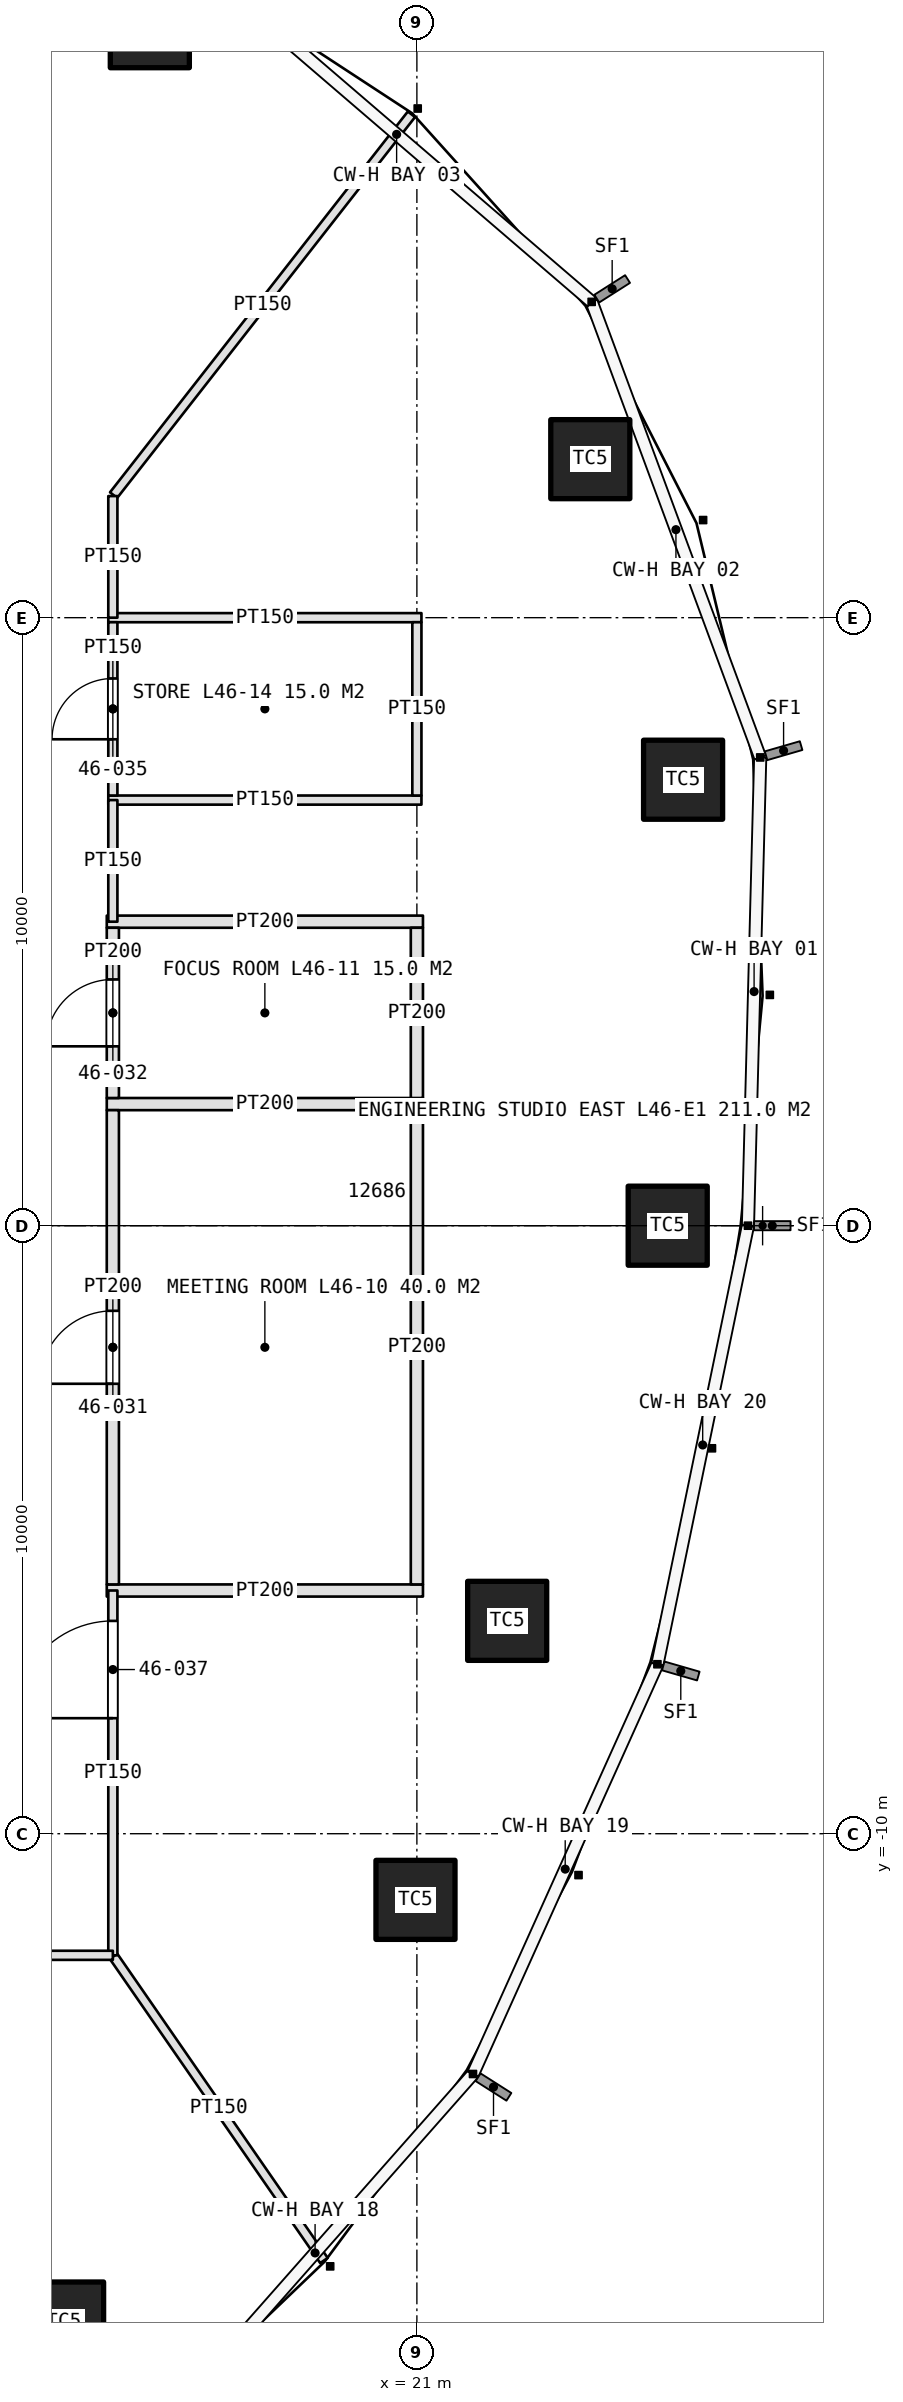
"""IFC4 building model, lengths in metres.
Left out: names, types, materials, properties, quantities, classifications, styles, units other than length and angle.
Written with IfcOpenShell. Run it as: python <this file> out.ifc"""

import sys

from ifc_helpers import new_model, si_unit, direction, frame, frame_2d, origin, origin_2d, place, context, subcontext, project, spatial, rectangle, extrude, element, fill, save


model = new_model("IFC4")
c1 = context("Model", 3, precision=1e-05, world=origin(), true_north=direction((0.0, 1.0)))
c2 = subcontext(c1, "Body", "Model", "MODEL_VIEW")
j1 = project(units=[si_unit("LENGTHUNIT", "METRE"), si_unit("PLANEANGLEUNIT", "RADIAN")], contexts=[c1])
p1 = place(None, origin())
s1 = spatial("IfcSite", under=j1, at=p1, CompositionType="ELEMENT")
p2 = place(p1, origin())
s2 = spatial("IfcBuilding", under=s1, at=p2, CompositionType="ELEMENT")
p3 = place(p2, frame((0.0, 0.0, 211.6)))
s3 = spatial("IfcBuildingStorey", under=s2, at=p3, CompositionType="ELEMENT", Elevation=211.6)
for number, where, z_axis, x_axis in (
    (1, (25.125, 0.0, 0.0), (0.0, 0.0, 1.0), (1.0, 0.0, 0.0)),
    (2, (25.378, 7.335, 0.0), (0.0, 0.0, 1.0), (1.0, 0.0, 0.0)),
    (3, (23.852, 12.607, 0.0), (0.0, 0.0, 1.0), (1.0, 0.0, 0.0)),
    (4, (16.608, 19.695, 0.0), (0.0, 0.0, 1.0), (1.0, 0.0, 0.0)),
    (5, (15.198, -18.023, 0.0), (0.0, 0.0, 1.0), (1.0, 0.0, 0.0)),
    (6, (20.977, -11.088, 0.0), (0.0, 0.0, 1.0), (1.0, 0.0, 0.0)),
    (7, (22.485, -6.499, 0.0), (0.0, 0.0, 1.0), (1.0, 0.0, 0.0)),
):
    element("IfcColumn", number, at=place(p3, frame(where, z_axis=z_axis, x_axis=x_axis)), inside=s3, PredefinedType="COLUMN", context=c2, shape_type="SweptSolid", body=[
        extrude(rectangle(XDim=1.3, YDim=1.3, at=origin_2d()), origin(), (0.0, 0.0, 1.0), 4.2),
    ])
for number, where, z_axis, x_axis in (
    (8, (15.9, -6.0, 0.0), (0.0, 0.0, 1.0), (1.0, 0.0, 0.0)),
    (9, (15.9, 2.0, 0.0), (0.0, 0.0, 1.0), (1.0, 0.0, 0.0)),
    (10, (15.9, 5.0, 0.0), (0.0, 0.0, 1.0), (1.0, 0.0, 0.0)),
):
    element("IfcWall", number, at=place(p3, frame(where, z_axis=z_axis, x_axis=x_axis)), inside=s3, PredefinedType="PARTITIONING", context=c2, shape_type="SweptSolid", body=[
        extrude(rectangle(XDim=5.2, YDim=0.2, at=frame_2d((2.6, 0.0))), origin(), (0.0, 0.0, 1.0), 3.0),
    ])
p4 = place(p3, frame((16.0, -5.9, 0.0), z_axis=(0.0, 0.0, 1.0), x_axis=(0.0, 1.0, 0.0)))
e11 = element("IfcWall", 11, at=p4, inside=s3, PredefinedType="PARTITIONING", context=c2, shape_type="SweptSolid", body=[
    extrude(rectangle(XDim=7.8, YDim=0.2, at=frame_2d((3.9, 0.0))), origin(), (0.0, 0.0, 1.0), 3.0),
])
p5 = place(p4, frame((3.3, 0.0, 0.0)))
e12 = element("IfcOpeningElement", 12, at=p5, cuts=e11, PredefinedType="OPENING", context=c2, shape_type="SweptSolid", body=[
    extrude(rectangle(XDim=1.2, YDim=2.4, at=frame_2d((0.6, 1.2))), frame((0.0, 0.11, 0.0), z_axis=(0.0, -1.0, 0.0), x_axis=(1.0, 0.0, 0.0)), (0.0, 0.0, 1.0), 0.22),
])
p6 = place(p3, frame((21.0, -5.9, 0.0), z_axis=(0.0, 0.0, 1.0), x_axis=(0.0, 1.0, 0.0)))
e13 = element("IfcWall", 13, at=p6, inside=s3, PredefinedType="PARTITIONING", context=c2, shape_type="SweptSolid", body=[
    extrude(rectangle(XDim=7.8, YDim=0.2, at=frame_2d((3.9, 0.0))), origin(), (0.0, 0.0, 1.0), 3.0),
])
p7 = place(p3, frame((16.0, 2.1, 0.0), z_axis=(0.0, 0.0, 1.0), x_axis=(0.0, 1.0, 0.0)))
e14 = element("IfcWall", 14, at=p7, inside=s3, PredefinedType="PARTITIONING", context=c2, shape_type="SweptSolid", body=[
    extrude(rectangle(XDim=2.8, YDim=0.2, at=frame_2d((1.4, 0.0))), origin(), (0.0, 0.0, 1.0), 3.0),
])
p8 = place(p7, frame((0.85, 0.0, 0.0)))
e15 = element("IfcOpeningElement", 15, at=p8, cuts=e14, PredefinedType="OPENING", context=c2, shape_type="SweptSolid", body=[
    extrude(rectangle(XDim=1.1, YDim=2.3, at=frame_2d((0.55, 1.15))), frame((0.0, 0.11, 0.0), z_axis=(0.0, -1.0, 0.0), x_axis=(1.0, 0.0, 0.0)), (0.0, 0.0, 1.0), 0.22),
])
p9 = place(p3, frame((21.0, 2.1, 0.0), z_axis=(0.0, 0.0, 1.0), x_axis=(0.0, 1.0, 0.0)))
e16 = element("IfcWall", 16, at=p9, inside=s3, PredefinedType="PARTITIONING", context=c2, shape_type="SweptSolid", body=[
    extrude(rectangle(XDim=2.8, YDim=0.2, at=frame_2d((1.4, 0.0))), origin(), (0.0, 0.0, 1.0), 3.0),
])
for number, where, z_axis, x_axis in (
    (17, (15.925, 7.0, 0.0), (0.0, 0.0, 1.0), (1.0, 0.0, 0.0)),
    (18, (15.925, 10.0, 0.0), (0.0, 0.0, 1.0), (1.0, 0.0, 0.0)),
):
    element("IfcWall", number, at=place(p3, frame(where, z_axis=z_axis, x_axis=x_axis)), inside=s3, PredefinedType="PARTITIONING", context=c2, shape_type="SweptSolid", body=[
        extrude(rectangle(XDim=5.15, YDim=0.15, at=frame_2d((2.575, 0.0))), origin(), (0.0, 0.0, 1.0), 3.0),
    ])
p10 = place(p3, frame((16.0, 7.075, 0.0), z_axis=(0.0, 0.0, 1.0), x_axis=(0.0, 1.0, 0.0)))
e19 = element("IfcWall", 19, at=p10, inside=s3, PredefinedType="PARTITIONING", context=c2, shape_type="SweptSolid", body=[
    extrude(rectangle(XDim=2.85, YDim=0.15, at=frame_2d((1.425, 0.0))), origin(), (0.0, 0.0, 1.0), 3.0),
])
p11 = place(p10, frame((0.925, 0.0, 0.0)))
e20 = element("IfcOpeningElement", 20, at=p11, cuts=e19, PredefinedType="OPENING", context=c2, shape_type="SweptSolid", body=[
    extrude(rectangle(XDim=1.0, YDim=2.2, at=frame_2d((0.5, 1.1))), frame((0.0, 0.085, 0.0), z_axis=(0.0, -1.0, 0.0), x_axis=(1.0, 0.0, 0.0)), (0.0, 0.0, 1.0), 0.17),
])
p12 = place(p3, frame((21.0, 7.075, 0.0), z_axis=(0.0, 0.0, 1.0), x_axis=(0.0, 1.0, 0.0)))
e21 = element("IfcWall", 21, at=p12, inside=s3, PredefinedType="PARTITIONING", context=c2, shape_type="SweptSolid", body=[
    extrude(rectangle(XDim=2.85, YDim=0.15, at=frame_2d((1.425, 0.0))), origin(), (0.0, 0.0, 1.0), 3.0),
])
p13 = place(p3, frame((16.011, -12.016, 0.0), z_axis=(0.0, 0.0, 1.0), x_axis=(0.568863489071, -0.822431961199, 0.0)))
e22 = element("IfcWall", 22, at=p13, inside=s3, PredefinedType="PARTITIONING", context=c2, shape_type="SweptSolid", body=[
    extrude(rectangle(XDim=6.083, YDim=0.15, at=frame_2d((3.042, 0.0))), origin(), (0.0, 0.0, 1.0), 3.0),
])
p14 = place(p3, frame((16.012, 12.016, 0.0), z_axis=(0.0, 0.0, 1.0), x_axis=(0.616030058222, 0.787722646219, 0.0)))
e23 = element("IfcWall", 23, at=p14, inside=s3, PredefinedType="PARTITIONING", context=c2, shape_type="SweptSolid", body=[
    extrude(rectangle(XDim=7.952, YDim=0.15, at=frame_2d((3.976, 0.0))), origin(), (0.0, 0.0, 1.0), 3.0),
])
p15 = place(p3, frame((16.0, -12.0, 0.0), z_axis=(0.0, 0.0, 1.0), x_axis=(0.0, 1.0, 0.0)))
e24 = element("IfcWall", 24, at=p15, inside=s3, PredefinedType="PARTITIONING", context=c2, shape_type="SweptSolid", body=[
    extrude(rectangle(XDim=6.0, YDim=0.15, at=frame_2d((3.0, 0.0))), origin(), (0.0, 0.0, 1.0), 3.0),
])
p16 = place(p15, frame((3.9, 0.0, 0.0)))
e25 = element("IfcOpeningElement", 25, at=p16, cuts=e24, PredefinedType="OPENING", context=c2, shape_type="SweptSolid", body=[
    extrude(rectangle(XDim=1.6, YDim=2.4, at=frame_2d((0.8, 1.2))), frame((0.0, 0.085, 0.0), z_axis=(0.0, -1.0, 0.0), x_axis=(1.0, 0.0, 0.0)), (0.0, 0.0, 1.0), 0.17),
])
for number, where, z_axis, x_axis in (
    (26, (16.0, 5.0, 0.0), (0.0, 0.0, 1.0), (0.0, 1.0, 0.0)),
    (27, (16.0, 10.0, 0.0), (0.0, 0.0, 1.0), (0.0, 1.0, 0.0)),
):
    element("IfcWall", number, at=place(p3, frame(where, z_axis=z_axis, x_axis=x_axis)), inside=s3, PredefinedType="PARTITIONING", context=c2, shape_type="SweptSolid", body=[
        extrude(rectangle(XDim=2.0, YDim=0.15, at=frame_2d((1.0, 0.0))), origin(), (0.0, 0.0, 1.0), 3.0),
    ])
p17 = place(p3, frame((12.0, -12.0, 0.0), z_axis=(0.0, 0.0, 1.0), x_axis=(1.0, 0.0, 0.0)))
e28 = element("IfcWall", 28, at=p17, inside=s3, PredefinedType="PARTITIONING", context=c2, shape_type="SweptSolid", body=[
    extrude(rectangle(XDim=4.0, YDim=0.15, at=frame_2d((2.0, 0.0))), origin(), (0.0, 0.0, 1.0), 3.0),
])
p18 = place(p5, origin())
e29 = element("IfcDoor", 29, at=p18, inside=s3, OperationType="SINGLE_SWING_LEFT", PredefinedType="DOOR", context=c2, shape_type="SweptSolid", body=[
    extrude(rectangle(XDim=1.2, YDim=2.4, at=frame_2d((0.6, 1.2))), frame((0.0, 0.025, 0.0), z_axis=(0.0, -1.0, 0.0), x_axis=(1.0, 0.0, 0.0)), (0.0, 0.0, 1.0), 0.05),
])
fill(e12, e29)
p19 = place(p8, origin())
e30 = element("IfcDoor", 30, at=p19, inside=s3, OperationType="SINGLE_SWING_LEFT", PredefinedType="DOOR", context=c2, shape_type="SweptSolid", body=[
    extrude(rectangle(XDim=1.1, YDim=2.3, at=frame_2d((0.55, 1.15))), frame((0.0, 0.025, 0.0), z_axis=(0.0, -1.0, 0.0), x_axis=(1.0, 0.0, 0.0)), (0.0, 0.0, 1.0), 0.05),
])
fill(e15, e30)
p20 = place(p11, origin())
e31 = element("IfcDoor", 31, at=p20, inside=s3, OperationType="SINGLE_SWING_LEFT", PredefinedType="DOOR", context=c2, shape_type="SweptSolid", body=[
    extrude(rectangle(XDim=1.0, YDim=2.2, at=frame_2d((0.5, 1.1))), frame((0.0, 0.025, 0.0), z_axis=(0.0, -1.0, 0.0), x_axis=(1.0, 0.0, 0.0)), (0.0, 0.0, 1.0), 0.05),
])
fill(e20, e31)
p21 = place(p16, origin())
e32 = element("IfcDoor", 32, at=p21, inside=s3, OperationType="DOUBLE_DOOR_SINGLE_SWING", PredefinedType="DOOR", context=c2, shape_type="SweptSolid", body=[
    extrude(rectangle(XDim=1.6, YDim=2.4, at=frame_2d((0.8, 1.2))), frame((0.0, 0.025, 0.0), z_axis=(0.0, -1.0, 0.0), x_axis=(1.0, 0.0, 0.0)), (0.0, 0.0, 1.0), 0.05),
])
fill(e25, e32)
save(model, sys.argv[1])
